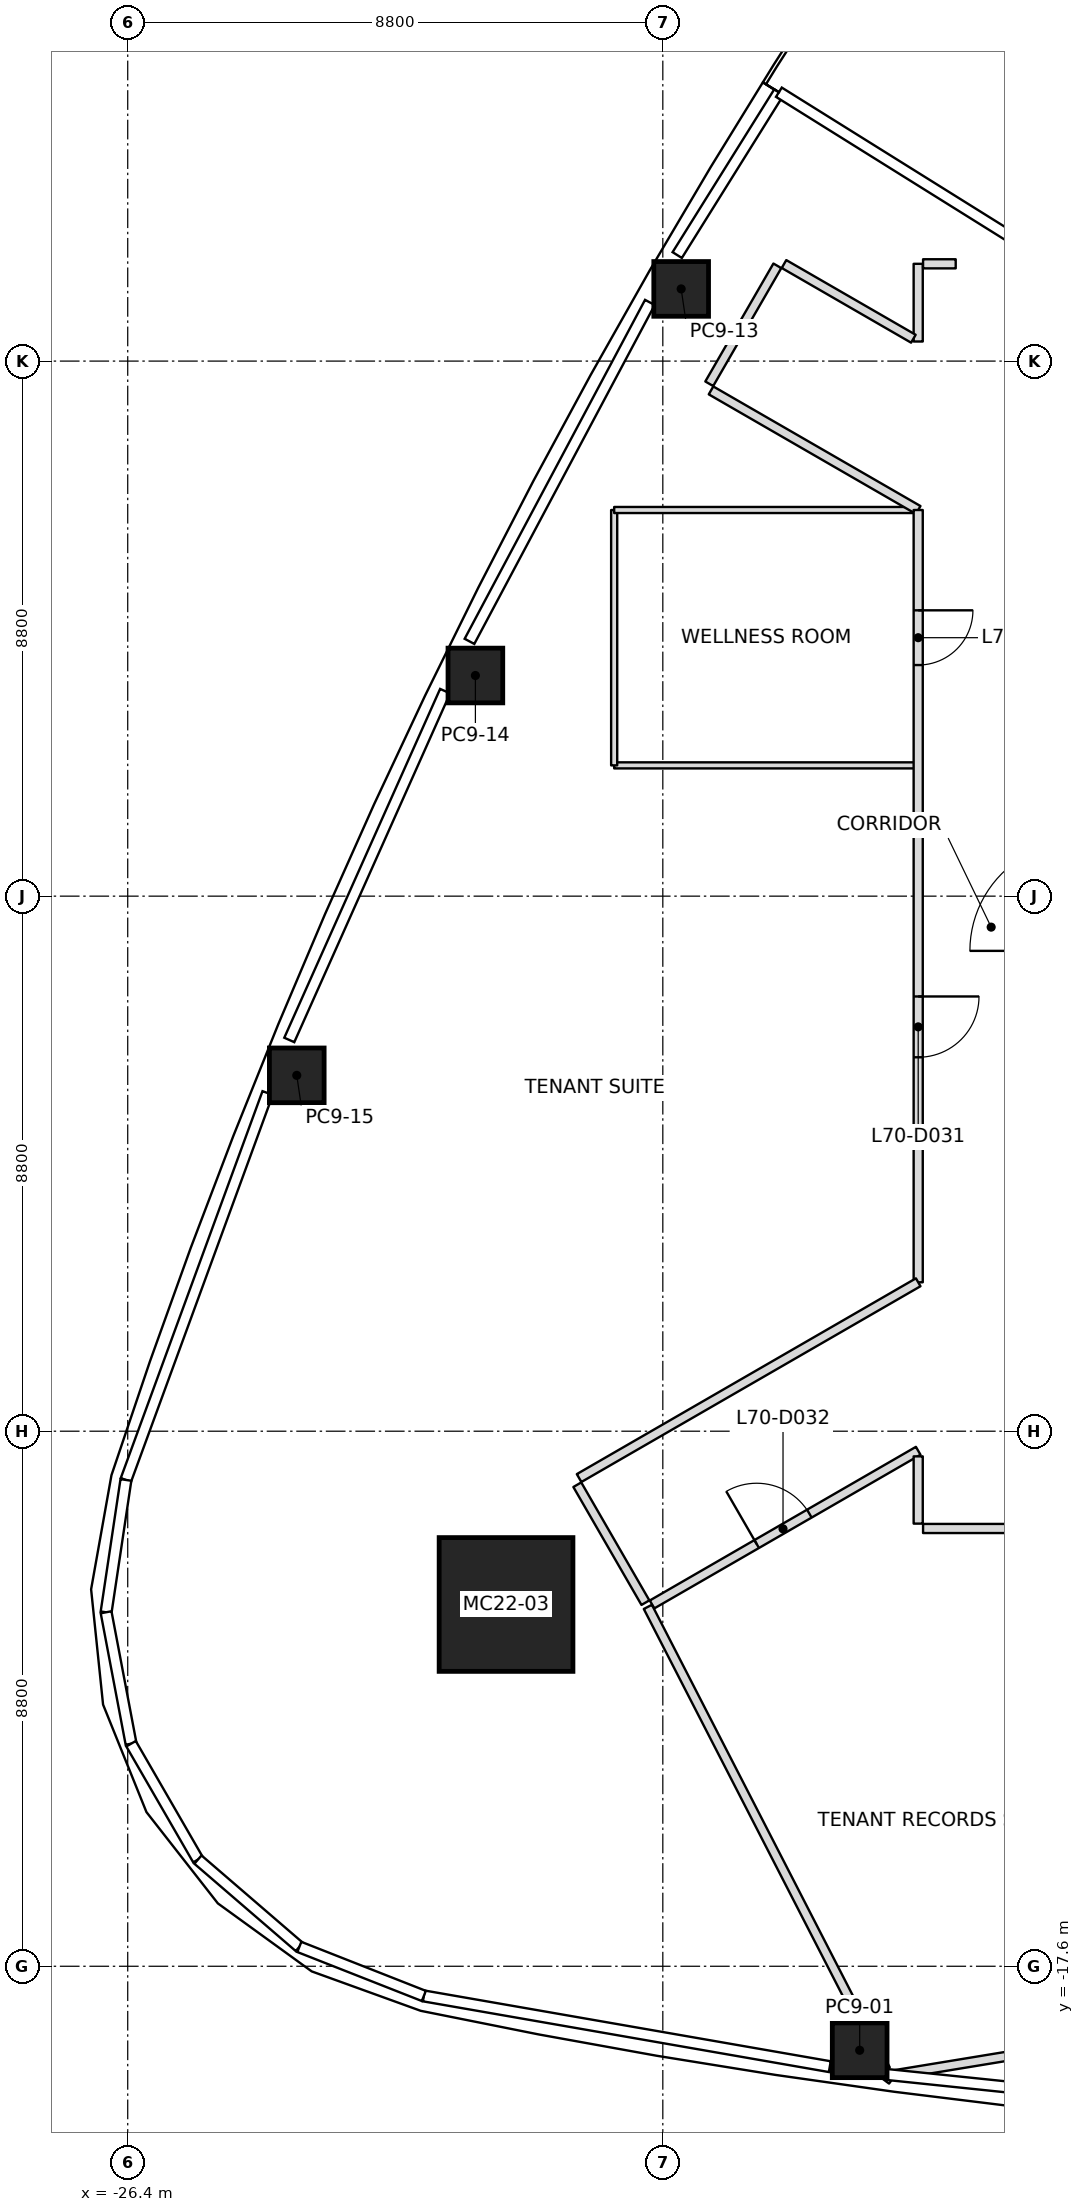
"""IFC4 building model, lengths in metres.
Left out: names, types, materials, properties, quantities, classifications, styles, units other than length and angle.
Written with IfcOpenShell. Run it as: python <this file> out.ifc"""

import sys

from ifc_helpers import new_model, si_unit, direction, frame, frame_2d, origin, origin_2d, place, context, subcontext, project, spatial, rectangle, extrude, element, fill, save


model = new_model("IFC4")
c1 = context("Model", 3, precision=1e-05, world=origin(), true_north=direction((0.0, 1.0)))
c2 = subcontext(c1, "Body", "Model", "MODEL_VIEW")
j1 = project(units=[si_unit("LENGTHUNIT", "METRE"), si_unit("PLANEANGLEUNIT", "RADIAN")], contexts=[c1])
p1 = place(None, origin())
s1 = spatial("IfcSite", under=j1, at=p1, CompositionType="ELEMENT")
p2 = place(p1, origin())
s2 = spatial("IfcBuilding", under=s1, at=p2, CompositionType="ELEMENT")
p3 = place(p2, frame((0.0, 0.0, 307.0)))
s3 = spatial("IfcBuildingStorey", under=s2, at=p3, CompositionType="ELEMENT", Elevation=307.0)
p4 = place(p3, frame((-20.178, -11.65, 0.0), z_axis=(0.027695790401, 0.015983033227, 0.999488612163), x_axis=(0.999616398022, -0.00044283261, -0.027692249912)))
e1 = element("IfcColumn", 1, at=p4, inside=s3, PredefinedType="COLUMN", context=c2, shape_type="SweptSolid", body=[
    extrude(rectangle(XDim=2.2, YDim=2.2, at=origin_2d()), origin(), (0.0, 0.0, 1.0), 4.002),
])
p5 = place(p3, frame((-14.363, -18.982, 0.0), z_axis=(0.017452456582, 0.010373837829, 0.999793876381), x_axis=(-0.990343726518, 0.137723680124, 0.015858476572)))
e2 = element("IfcColumn", 2, at=p5, inside=s3, PredefinedType="COLUMN", context=c2, shape_type="SweptSolid", body=[
    extrude(rectangle(XDim=0.9, YDim=0.9, at=origin_2d()), origin(), (0.0, 0.0, 1.0), 4.001),
])
p6 = place(p3, frame((-17.298, 9.987, 0.0), z_axis=(0.009887052741, -0.005675900648, 0.999935013058), x_axis=(0.49997556095, 0.866039512773, -2.7732311e-05)))
e3 = element("IfcColumn", 3, at=p6, inside=s3, PredefinedType="COLUMN", context=c2, shape_type="SweptSolid", body=[
    extrude(rectangle(XDim=0.9, YDim=0.9, at=origin_2d()), origin(), (0.0, 0.0, 1.0), 4.0),
])
p7 = place(p3, frame((-20.682, 3.629, 0.0), z_axis=(0.014036674448, 0.002013957638, 0.999899452818), x_axis=(0.439063455836, 0.898420675548, -0.007973173653)))
e4 = element("IfcColumn", 4, at=p7, inside=s3, PredefinedType="COLUMN", context=c2, shape_type="SweptSolid", body=[
    extrude(rectangle(XDim=0.9, YDim=0.9, at=origin_2d()), origin(), (0.0, 0.0, 1.0), 4.0),
])
p8 = place(p3, frame((-23.62, -2.948, 0.0), z_axis=(0.017696547774, 0.0099466803, 0.999793926641), x_axis=(0.376065101315, 0.926457269165, -0.015873499405)))
e5 = element("IfcColumn", 5, at=p8, inside=s3, PredefinedType="COLUMN", context=c2, shape_type="SweptSolid", body=[
    extrude(rectangle(XDim=0.9, YDim=0.9, at=origin_2d()), origin(), (0.0, 0.0, 1.0), 4.001),
])
p9 = place(p3, frame((-17.846, -11.689, 0.0), z_axis=(0.0, 0.0, 1.0), x_axis=(0.457266107694, -0.889329920083, 0.0)))
e6 = element("IfcWall", 6, at=p9, inside=s3, PredefinedType="PARTITIONING", context=c2, shape_type="SweptSolid", body=[
    extrude(rectangle(XDim=8.554, YDim=0.15, at=frame_2d((4.277, 0.0))), origin(), (0.0, 0.0, 1.0), 3.45),
])
p10 = place(p3, frame((-10.2, -18.794, 0.0), z_axis=(0.0, 0.0, 1.0), x_axis=(-0.986776260691, -0.162088282538, 0.0)))
e7 = element("IfcWall", 7, at=p10, inside=s3, PredefinedType="PARTITIONING", context=c2, shape_type="SweptSolid", body=[
    extrude(rectangle(XDim=3.633, YDim=0.15, at=frame_2d((1.816, 0.0))), origin(), (0.0, 0.0, 1.0), 3.234),
])
p11 = place(p3, frame((-13.835, -19.47, 0.0), z_axis=(0.0, 0.0, 1.0), x_axis=(-0.799522420025, 0.60063624589, 0.0)))
e8 = element("IfcWall", 8, at=p11, inside=s3, PredefinedType="PARTITIONING", context=c2, shape_type="SweptSolid", body=[
    extrude(rectangle(XDim=0.184, YDim=0.15, at=frame_2d((0.092, 0.0))), origin(), (0.0, 0.0, 1.0), 3.45),
])
p12 = place(p3, frame((-19.006, -9.68, 0.0), z_axis=(0.0, 0.0, 1.0), x_axis=(0.49994888933, -0.866054910533, 0.0)))
e9 = element("IfcWall", 9, at=p12, inside=s3, PredefinedType="PARTITIONING", context=c2, shape_type="SweptSolid", body=[
    extrude(rectangle(XDim=2.24, YDim=0.15, at=frame_2d((1.12, 0.0))), origin(), (0.0, 0.0, 1.0), 3.233),
])
p13 = place(p3, frame((-16.807, 8.318, 0.0), z_axis=(0.0, 0.0, 1.0), x_axis=(0.866023334807, -0.500003583557, 0.0)))
e10 = element("IfcWall", 10, at=p13, inside=s3, PredefinedType="PARTITIONING", context=c2, shape_type="SweptSolid", body=[
    extrude(rectangle(XDim=3.934, YDim=0.15, at=frame_2d((1.967, 0.0))), origin(), (0.0, 0.0, 1.0), 3.45),
])
p14 = place(p3, frame((-13.4, 6.351, 0.0), z_axis=(0.0, 0.0, 1.0), x_axis=(0.0, -1.0, 0.0)))
e11 = element("IfcWall", 11, at=p14, inside=s3, PredefinedType="PARTITIONING", context=c2, shape_type="SweptSolid", body=[
    extrude(rectangle(XDim=12.702, YDim=0.15, at=frame_2d((6.351, 0.0))), origin(), (0.0, 0.0, 1.0), 3.393),
])
p15 = place(p14, frame((1.65, 0.0, 0.0)))
e12 = element("IfcOpeningElement", 12, at=p15, cuts=e11, PredefinedType="OPENING", context=c2, shape_type="SweptSolid", body=[
    extrude(rectangle(XDim=0.9, YDim=2.1, at=frame_2d((0.45, 1.05))), frame((0.0, 0.075, 0.0), z_axis=(0.0, -1.0, 0.0), x_axis=(1.0, 0.0, 0.0)), (0.0, 0.0, 1.0), 0.15),
])
p16 = place(p14, frame((8.001, 0.0, 0.0)))
e13 = element("IfcOpeningElement", 13, at=p16, cuts=e11, PredefinedType="OPENING", context=c2, shape_type="SweptSolid", body=[
    extrude(rectangle(XDim=1.0, YDim=2.1, at=frame_2d((0.5, 1.05))), frame((0.0, 0.075, 0.0), z_axis=(0.0, -1.0, 0.0), x_axis=(1.0, 0.0, 0.0)), (0.0, 0.0, 1.0), 0.15),
])
p17 = place(p3, frame((-13.4, -6.351, 0.0), z_axis=(0.0, 0.0, 1.0), x_axis=(-0.866015754151, -0.500016713282, 0.0)))
e14 = element("IfcWall", 14, at=p17, inside=s3, PredefinedType="PARTITIONING", context=c2, shape_type="SweptSolid", body=[
    extrude(rectangle(XDim=6.44, YDim=0.15, at=frame_2d((3.22, 0.0))), origin(), (0.0, 0.0, 1.0), 3.317),
])
p18 = place(p3, frame((-17.777, -11.649, 0.0), z_axis=(0.0, 0.0, 1.0), x_axis=(0.866019873856, 0.500009577994, 0.0)))
e15 = element("IfcWall", 15, at=p18, inside=s3, PredefinedType="PARTITIONING", context=c2, shape_type="SweptSolid", body=[
    extrude(rectangle(XDim=5.054, YDim=0.15, at=frame_2d((2.527, 0.0))), origin(), (0.0, 0.0, 1.0), 3.233),
])
p19 = place(p18, frame((1.987, 0.0, 0.0)))
e16 = element("IfcOpeningElement", 16, at=p19, cuts=e15, PredefinedType="OPENING", context=c2, shape_type="SweptSolid", body=[
    extrude(rectangle(XDim=1.0, YDim=2.1, at=frame_2d((0.5, 1.05))), frame((0.0, 0.075, 0.0), z_axis=(0.0, -1.0, 0.0), x_axis=(1.0, 0.0, 0.0)), (0.0, 0.0, 1.0), 0.15),
])
p20 = place(p3, frame((-13.4, -9.214, 0.0), z_axis=(0.0, 0.0, 1.0), x_axis=(0.0, -1.0, 0.0)))
e17 = element("IfcWall", 17, at=p20, inside=s3, PredefinedType="PARTITIONING", context=c2, shape_type="SweptSolid", body=[
    extrude(rectangle(XDim=1.106, YDim=0.15, at=frame_2d((0.553, 0.0))), origin(), (0.0, 0.0, 1.0), 3.233),
])
p21 = place(p3, frame((-15.716, 10.367, 0.0), z_axis=(0.0, 0.0, 1.0), x_axis=(-0.49994888933, -0.866054910533, 0.0)))
e18 = element("IfcWall", 18, at=p21, inside=s3, PredefinedType="PARTITIONING", context=c2, shape_type="SweptSolid", body=[
    extrude(rectangle(XDim=2.24, YDim=0.15, at=frame_2d((1.12, 0.0))), origin(), (0.0, 0.0, 1.0), 3.45),
])
p22 = place(p3, frame((-13.4, 10.4, 0.0), z_axis=(0.0, 0.0, 1.0), x_axis=(0.0, -1.0, 0.0)))
e19 = element("IfcWall", 19, at=p22, inside=s3, PredefinedType="PARTITIONING", context=c2, shape_type="SweptSolid", body=[
    extrude(rectangle(XDim=1.278, YDim=0.15, at=frame_2d((0.639, 0.0))), origin(), (0.0, 0.0, 1.0), 3.45),
])
p23 = place(p3, frame((-13.479, 9.168, 0.0), z_axis=(0.0, 0.0, 1.0), x_axis=(-0.866008518766, 0.50002924457, 0.0)))
e20 = element("IfcWall", 20, at=p23, inside=s3, PredefinedType="PARTITIONING", context=c2, shape_type="SweptSolid", body=[
    extrude(rectangle(XDim=2.457, YDim=0.15, at=frame_2d((1.229, 0.0))), origin(), (0.0, 0.0, 1.0), 3.45),
])
p24 = place(p3, frame((-13.32, -10.4, 0.0), z_axis=(0.0, 0.0, 1.0), x_axis=(1.0, 0.0, 0.0)))
e21 = element("IfcWall", 21, at=p24, inside=s3, PredefinedType="PARTITIONING", context=c2, shape_type="SweptSolid", body=[
    extrude(rectangle(XDim=12.12, YDim=0.15, at=frame_2d((6.06, 0.0))), origin(), (0.0, 0.0, 1.0), 3.393),
])
p25 = place(p24, frame((4.77, 0.0, 0.0)))
e22 = element("IfcOpeningElement", 22, at=p25, cuts=e21, PredefinedType="OPENING", context=c2, shape_type="SweptSolid", body=[
    extrude(rectangle(XDim=0.9, YDim=2.1, at=frame_2d((0.45, 1.05))), frame((0.0, 0.075, 0.0), z_axis=(0.0, -1.0, 0.0), x_axis=(1.0, 0.0, 0.0)), (0.0, 0.0, 1.0), 0.15),
])
p26 = place(p24, frame((9.27, 0.0, 0.0)))
e23 = element("IfcOpeningElement", 23, at=p26, cuts=e21, PredefinedType="OPENING", context=c2, shape_type="SweptSolid", body=[
    extrude(rectangle(XDim=1.0, YDim=2.1, at=frame_2d((0.5, 1.05))), frame((0.0, 0.075, 0.0), z_axis=(0.0, -1.0, 0.0), x_axis=(1.0, 0.0, 0.0)), (0.0, 0.0, 1.0), 0.15),
])
p27 = place(p3, frame((-12.783, 10.4, 0.0), z_axis=(0.0, 0.0, 1.0), x_axis=(-1.0, 0.0, 0.0)))
e24 = element("IfcWall", 24, at=p27, inside=s3, PredefinedType="PARTITIONING", context=c2, shape_type="SweptSolid", body=[
    extrude(rectangle(XDim=0.537, YDim=0.15, at=frame_2d((0.269, 0.0))), origin(), (0.0, 0.0, 1.0), 3.45),
])
p28 = place(p3, frame((-13.43, 2.151, 0.0), z_axis=(0.0, 0.0, 1.0), x_axis=(-1.0, 0.0, 0.0)))
e25 = element("IfcWall", 25, at=p28, inside=s3, PredefinedType="PARTITIONING", context=c2, shape_type="SweptSolid", body=[
    extrude(rectangle(XDim=4.97, YDim=0.1, at=frame_2d((2.485, 0.0))), origin(), (0.0, 0.0, 1.0), 3.45),
])
p29 = place(p3, frame((-18.4, 2.151, 0.0), z_axis=(0.0, 0.0, 1.0), x_axis=(0.0, 1.0, 0.0)))
e26 = element("IfcWall", 26, at=p29, inside=s3, PredefinedType="PARTITIONING", context=c2, shape_type="SweptSolid", body=[
    extrude(rectangle(XDim=4.2, YDim=0.1, at=frame_2d((2.1, 0.0))), origin(), (0.0, 0.0, 1.0), 3.45),
])
p30 = place(p3, frame((-18.4, 6.351, 0.0), z_axis=(0.0, 0.0, 1.0), x_axis=(1.0, 0.0, 0.0)))
e27 = element("IfcWall", 27, at=p30, inside=s3, PredefinedType="PARTITIONING", context=c2, shape_type="SweptSolid", body=[
    extrude(rectangle(XDim=4.94, YDim=0.1, at=frame_2d((2.47, 0.0))), origin(), (0.0, 0.0, 1.0), 3.443),
])
p31 = place(p15, origin())
e28 = element("IfcDoor", 28, at=p31, inside=s3, OperationType="SINGLE_SWING_RIGHT", PredefinedType="DOOR", context=c2, shape_type="SweptSolid", body=[
    extrude(rectangle(XDim=0.9, YDim=2.1, at=frame_2d((0.45, 1.05))), frame((0.0, 0.025, 0.0), z_axis=(0.0, -1.0, 0.0), x_axis=(1.0, 0.0, 0.0)), (0.0, 0.0, 1.0), 0.05),
])
fill(e12, e28)
p32 = place(p16, origin())
e29 = element("IfcDoor", 29, at=p32, inside=s3, OperationType="SINGLE_SWING_RIGHT", PredefinedType="DOOR", context=c2, shape_type="SweptSolid", body=[
    extrude(rectangle(XDim=1.0, YDim=2.1, at=frame_2d((0.5, 1.05))), frame((0.0, 0.025, 0.0), z_axis=(0.0, -1.0, 0.0), x_axis=(1.0, 0.0, 0.0)), (0.0, 0.0, 1.0), 0.05),
])
fill(e13, e29)
p33 = place(p19, origin())
e30 = element("IfcDoor", 30, at=p33, inside=s3, OperationType="SINGLE_SWING_LEFT", PredefinedType="DOOR", context=c2, shape_type="SweptSolid", body=[
    extrude(rectangle(XDim=1.0, YDim=2.1, at=frame_2d((0.5, 1.05))), frame((0.0, 0.025, 0.0), z_axis=(0.0, -1.0, 0.0), x_axis=(1.0, 0.0, 0.0)), (0.0, 0.0, 1.0), 0.05),
])
fill(e16, e30)
save(model, sys.argv[1])
